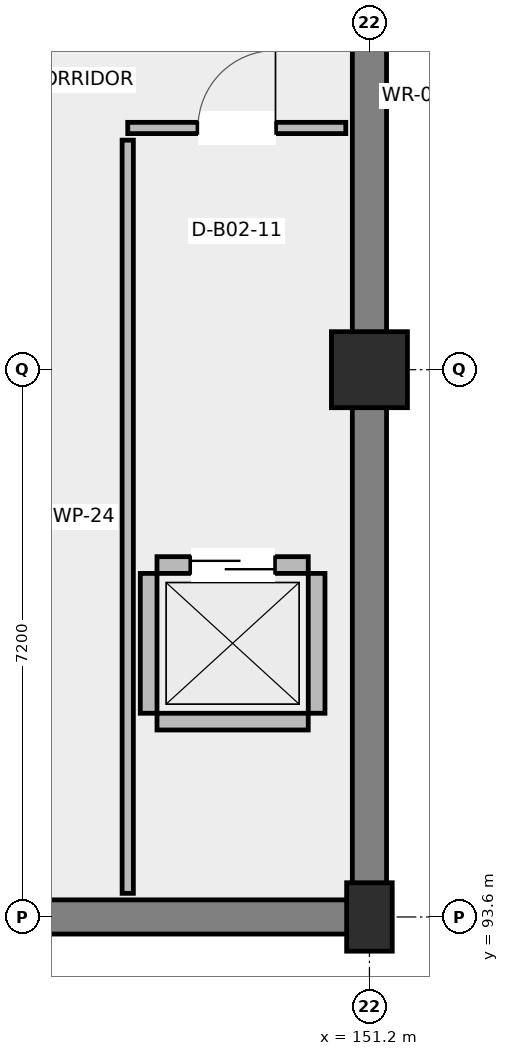
"""IFC4 building model, lengths in metres.
Left out: names, types, materials, properties, quantities, classifications, styles, units other than length and angle.
Written with IfcOpenShell. Run it as: python <this file> out.ifc"""

import sys

from ifc_helpers import new_model, si_unit, direction, frame, frame_2d, origin, origin_2d, place, context, subcontext, project, spatial, rectangle, extrude, element, fill, save


model = new_model("IFC4")
c1 = context("Model", 3, precision=1e-05, world=origin(), true_north=direction((0.0, 1.0)))
c2 = subcontext(c1, "Body", "Model", "MODEL_VIEW")
j1 = project(units=[si_unit("LENGTHUNIT", "METRE"), si_unit("PLANEANGLEUNIT", "RADIAN")], contexts=[c1])
p1 = place(None, origin())
s1 = spatial("IfcSite", under=j1, at=p1, CompositionType="ELEMENT")
p2 = place(p1, origin())
s2 = spatial("IfcBuilding", under=s1, at=p2, CompositionType="ELEMENT")
p3 = place(p2, frame((0.0, 0.0, -9.0)))
s3 = spatial("IfcBuildingStorey", under=s2, at=p3, CompositionType="ELEMENT", Elevation=-9.0)
p4 = place(p3, frame((151.2, 93.6, 0.0), z_axis=(0.0, 0.0, 1.0), x_axis=(1.0, 0.0, 0.0)))
e1 = element("IfcColumn", 1, at=p4, inside=s3, PredefinedType="COLUMN", context=c2, shape_type="SweptSolid", body=[
    extrude(rectangle(XDim=0.6, YDim=0.9, at=origin_2d()), origin(), (0.0, 0.0, 1.0), 4.15),
])
p5 = place(p3, frame((151.2, 100.8, 0.0), z_axis=(0.0, 0.0, 1.0), x_axis=(1.0, 0.0, 0.0)))
e2 = element("IfcColumn", 2, at=p5, inside=s3, PredefinedType="COLUMN", context=c2, shape_type="SweptSolid", body=[
    extrude(rectangle(XDim=1.0, YDim=1.0, at=origin_2d()), origin(), (0.0, 0.0, 1.0), 4.15),
])
p6 = place(p3, frame((151.2, 93.6, 0.0), z_axis=(0.0, 0.0, 1.0), x_axis=(0.0, 1.0, 0.0)))
e3 = element("IfcWall", 3, at=p6, inside=s3, PredefinedType="SOLIDWALL", context=c2, shape_type="SweptSolid", body=[
    extrude(rectangle(XDim=21.6, YDim=0.45, at=frame_2d((10.8, 0.0))), origin(), (0.0, 0.0, 1.0), 4.15),
])
p7 = place(p3, frame((86.4, 93.6, 0.0), z_axis=(0.0, 0.0, 1.0), x_axis=(1.0, 0.0, 0.0)))
e4 = element("IfcWall", 4, at=p7, inside=s3, PredefinedType="SOLIDWALL", context=c2, shape_type="SweptSolid", body=[
    extrude(rectangle(XDim=64.8, YDim=0.45, at=frame_2d((32.4, 0.0))), origin(), (0.0, 0.0, 1.0), 4.15),
])
p8 = place(p3, frame((148.405, 96.17, 0.0), z_axis=(0.0, 0.0, 1.0), x_axis=(1.0, 0.0, 0.0)))
e5 = element("IfcWall", 5, at=p8, inside=s3, PredefinedType="STANDARD", context=c2, shape_type="SweptSolid", body=[
    extrude(rectangle(XDim=1.99, YDim=0.22, at=frame_2d((0.995, 0.0))), origin(), (0.0, 0.0, 1.0), 3.19),
])
p9 = place(p3, frame((148.405, 98.23, 0.0), z_axis=(0.0, 0.0, 1.0), x_axis=(1.0, 0.0, 0.0)))
e6 = element("IfcWall", 6, at=p9, inside=s3, PredefinedType="STANDARD", context=c2, shape_type="SweptSolid", body=[
    extrude(rectangle(XDim=1.99, YDim=0.22, at=frame_2d((0.995, 0.0))), origin(), (0.0, 0.0, 1.0), 3.19),
])
p10 = place(p9, frame((0.445, 0.0, 0.0)))
e7 = element("IfcOpeningElement", 7, at=p10, cuts=e6, PredefinedType="OPENING", context=c2, shape_type="SweptSolid", body=[
    extrude(rectangle(XDim=1.1, YDim=2.15, at=frame_2d((0.55, 1.075))), frame((0.0, 0.12, 0.0), z_axis=(0.0, -1.0, 0.0), x_axis=(1.0, 0.0, 0.0)), (0.0, 0.0, 1.0), 0.24),
])
for number, where, z_axis, x_axis in (
    (8, (148.295, 96.28, 0.0), (0.0, 0.0, 1.0), (0.0, 1.0, 0.0)),
    (9, (150.505, 96.28, 0.0), (0.0, 0.0, 1.0), (0.0, 1.0, 0.0)),
):
    element("IfcWall", number, at=place(p3, frame(where, z_axis=z_axis, x_axis=x_axis)), inside=s3, PredefinedType="STANDARD", context=c2, shape_type="SweptSolid", body=[
        extrude(rectangle(XDim=1.84, YDim=0.22, at=frame_2d((0.92, 0.0))), origin(), (0.0, 0.0, 1.0), 3.19),
    ])
p11 = place(p3, frame((148.02, 103.98, 0.0), z_axis=(0.0, 0.0, 1.0), x_axis=(1.0, 0.0, 0.0)))
e10 = element("IfcWall", 10, at=p11, inside=s3, PredefinedType="PARTITIONING", context=c2, shape_type="SweptSolid", body=[
    extrude(rectangle(XDim=2.869, YDim=0.148, at=frame_2d((1.435, 0.0))), origin(), (0.0, 0.0, 1.0), 3.19),
])
p12 = place(p11, frame((0.924, 0.0, 0.0)))
e11 = element("IfcOpeningElement", 11, at=p12, cuts=e10, PredefinedType="OPENING", context=c2, shape_type="SweptSolid", body=[
    extrude(rectangle(XDim=1.02, YDim=2.15, at=frame_2d((0.51, 1.075))), frame((0.0, 0.084, 0.0), z_axis=(0.0, -1.0, 0.0), x_axis=(1.0, 0.0, 0.0)), (0.0, 0.0, 1.0), 0.168),
])
p13 = place(p3, frame((148.02, 93.911, 0.0), z_axis=(0.0, 0.0, 1.0), x_axis=(0.0, 1.0, 0.0)))
e12 = element("IfcWall", 12, at=p13, inside=s3, PredefinedType="PARTITIONING", context=c2, shape_type="SweptSolid", body=[
    extrude(rectangle(XDim=9.909, YDim=0.148, at=frame_2d((4.955, 0.0))), origin(), (0.0, 0.0, 1.0), 3.19),
])
p14 = place(p10, origin())
e13 = element("IfcDoor", 13, at=p14, inside=s3, OperationType="SLIDING_TO_LEFT", PredefinedType="DOOR", context=c2, shape_type="SweptSolid", body=[
    extrude(rectangle(XDim=1.1, YDim=2.15, at=frame_2d((0.55, 1.075))), frame((0.0, 0.025, 0.0), z_axis=(0.0, -1.0, 0.0), x_axis=(1.0, 0.0, 0.0)), (0.0, 0.0, 1.0), 0.05),
])
fill(e7, e13)
p15 = place(p12, origin())
e14 = element("IfcDoor", 14, at=p15, inside=s3, OperationType="SINGLE_SWING_RIGHT", PredefinedType="DOOR", context=c2, shape_type="SweptSolid", body=[
    extrude(rectangle(XDim=1.02, YDim=2.15, at=frame_2d((0.51, 1.075))), frame((0.0, 0.025, 0.0), z_axis=(0.0, -1.0, 0.0), x_axis=(1.0, 0.0, 0.0)), (0.0, 0.0, 1.0), 0.05),
])
fill(e11, e14)
save(model, sys.argv[1])
